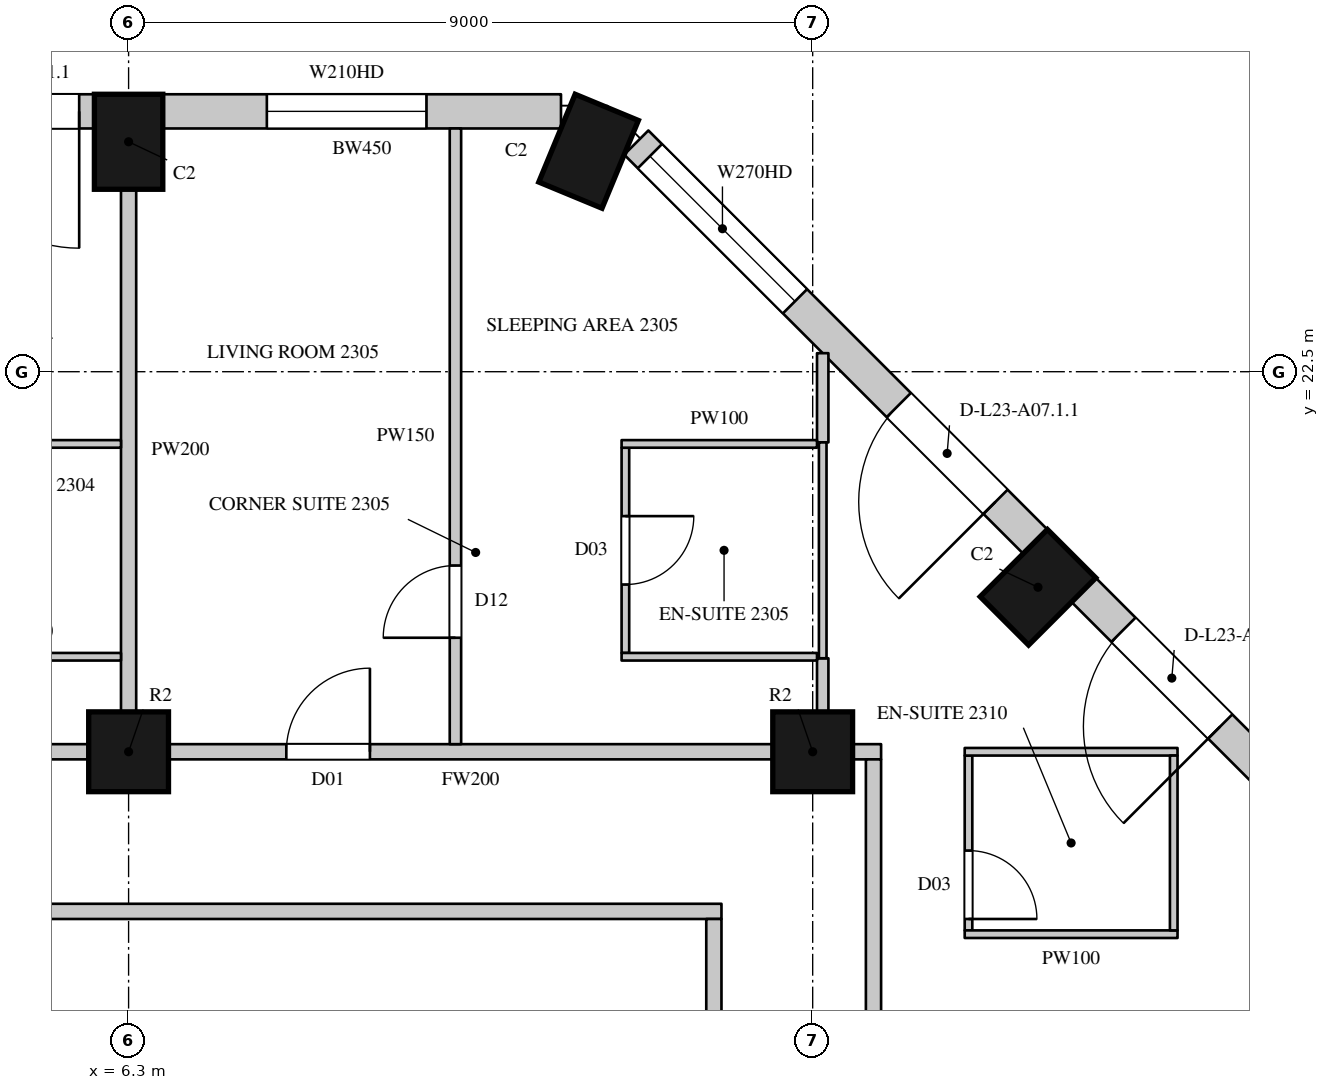
"""IFC4 building model, lengths in metres.
Left out: names, types, materials, properties, quantities, classifications, styles, units other than length and angle.
Written with IfcOpenShell. Run it as: python <this file> out.ifc"""

import sys

from ifc_helpers import new_model, si_unit, direction, frame, frame_2d, origin, origin_2d, place, context, subcontext, project, spatial, rectangle, circle, extrude, element, fill, save


model = new_model("IFC4")
c1 = context("Model", 3, precision=1e-05, world=origin(), true_north=direction((0.0, 1.0)))
c2 = subcontext(c1, "Body", "Model", "MODEL_VIEW")
j1 = project(units=[si_unit("LENGTHUNIT", "METRE"), si_unit("PLANEANGLEUNIT", "RADIAN")], contexts=[c1])
p1 = place(None, origin())
s1 = spatial("IfcSite", under=j1, at=p1, CompositionType="ELEMENT")
p2 = place(p1, origin())
s2 = spatial("IfcBuilding", under=s1, at=p2, CompositionType="ELEMENT")
p3 = place(p2, frame((0.0, 0.0, 113.1)))
s3 = spatial("IfcBuildingStorey", under=s2, at=p3, CompositionType="ELEMENT", Elevation=113.1)
for number, where, z_axis, x_axis in (
    (1, (18.264, 19.664, 0.0), (0.0, 0.0, 1.0), (-0.707, 0.707, 0.0)),
    (2, (12.352, 25.4, 0.0), (0.0, 0.0, 1.0), (-0.924, 0.383, 0.0)),
    (3, (6.3, 25.525, 0.0), (0.0, 0.0, 1.0), (-1.0, 0.0, 0.0)),
):
    element("IfcColumn", number, at=place(p3, frame(where, z_axis=z_axis, x_axis=x_axis)), inside=s3, PredefinedType="COLUMN", context=c2, shape_type="SweptSolid", body=[
        extrude(rectangle(XDim=0.9, YDim=1.25, at=origin_2d()), origin(), (0.0, 0.0, 1.0), 3.6),
    ])
for number, where, z_axis, x_axis in (
    (4, (6.3, 17.5, 0.0), (0.0, 0.0, 1.0), (1.0, 0.0, 0.0)),
    (5, (15.3, 17.5, 0.0), (0.0, 0.0, 1.0), (1.0, 0.0, 0.0)),
):
    element("IfcColumn", number, at=place(p3, frame(where, z_axis=z_axis, x_axis=x_axis)), inside=s3, PredefinedType="COLUMN", context=c2, shape_type="SweptSolid", body=[
        extrude(circle(Radius=0.525, at=origin_2d()), origin(), (0.0, 0.0, 1.0), 3.6),
    ])
p4 = place(p3, frame((24.115, 14.379, 0.0), z_axis=(0.0, 0.0, 1.0), x_axis=(-0.707106781187, 0.707106781187, 0.0)))
e6 = element("IfcWall", 6, at=p4, inside=s3, PredefinedType="SOLIDWALL", context=c2, shape_type="SweptSolid", body=[
    extrude(rectangle(XDim=7.424, YDim=0.45, at=frame_2d((3.712, 0.0))), origin(), (0.0, 0.0, 1.0), 3.3),
])
p5 = place(p4, frame((0.253, 0.0, 1.05)))
e7 = element("IfcOpeningElement", 7, at=p5, cuts=e6, PredefinedType="OPENING", context=c2, shape_type="SweptSolid", body=[
    extrude(rectangle(XDim=2.7, YDim=2.0, at=frame_2d((1.35, 1.0))), frame((0.0, 0.235, 0.0), z_axis=(0.0, -1.0, 0.0), x_axis=(1.0, 0.0, 0.0)), (0.0, 0.0, 1.0), 0.47),
])
p6 = place(p4, frame((4.884, 0.0, 0.0)))
e8 = element("IfcOpeningElement", 8, at=p6, cuts=e6, PredefinedType="OPENING", context=c2, shape_type="SweptSolid", body=[
    extrude(rectangle(XDim=1.8, YDim=2.4, at=frame_2d((0.9, 1.2))), frame((0.0, 0.235, 0.0), z_axis=(0.0, -1.0, 0.0), x_axis=(1.0, 0.0, 0.0)), (0.0, 0.0, 1.0), 0.47),
])
p7 = place(p3, frame((18.229, 20.265, 0.0), z_axis=(0.0, 0.0, 1.0), x_axis=(-0.707106781187, 0.707106781187, 0.0)))
e9 = element("IfcWall", 9, at=p7, inside=s3, PredefinedType="SOLIDWALL", context=c2, shape_type="SweptSolid", body=[
    extrude(rectangle(XDim=7.424, YDim=0.45, at=frame_2d((3.712, 0.0))), origin(), (0.0, 0.0, 1.0), 3.3),
])
p8 = place(p7, frame((0.74, 0.0, 0.0)))
e10 = element("IfcOpeningElement", 10, at=p8, cuts=e9, PredefinedType="OPENING", context=c2, shape_type="SweptSolid", body=[
    extrude(rectangle(XDim=1.8, YDim=2.4, at=frame_2d((0.9, 1.2))), frame((0.0, 0.235, 0.0), z_axis=(0.0, -1.0, 0.0), x_axis=(1.0, 0.0, 0.0)), (0.0, 0.0, 1.0), 0.47),
])
p9 = place(p7, frame((4.471, 0.0, 1.05)))
e11 = element("IfcOpeningElement", 11, at=p9, cuts=e9, PredefinedType="OPENING", context=c2, shape_type="SweptSolid", body=[
    extrude(rectangle(XDim=2.7, YDim=2.0, at=frame_2d((1.35, 1.0))), frame((0.0, 0.235, 0.0), z_axis=(0.0, -1.0, 0.0), x_axis=(1.0, 0.0, 0.0)), (0.0, 0.0, 1.0), 0.47),
])
p10 = place(p3, frame((11.989, 25.925, 0.0), z_axis=(0.0, 0.0, 1.0), x_axis=(-1.0, 0.0, 0.0)))
e12 = element("IfcWall", 12, at=p10, inside=s3, PredefinedType="SOLIDWALL", context=c2, shape_type="SweptSolid", body=[
    extrude(rectangle(XDim=5.239, YDim=0.45, at=frame_2d((2.619, 0.0))), origin(), (0.0, 0.0, 1.0), 3.3),
])
p11 = place(p10, frame((1.77, 0.0, 1.05)))
e13 = element("IfcOpeningElement", 13, at=p11, cuts=e12, PredefinedType="OPENING", context=c2, shape_type="SweptSolid", body=[
    extrude(rectangle(XDim=2.1, YDim=2.0, at=frame_2d((1.05, 1.0))), frame((0.0, 0.235, 0.0), z_axis=(0.0, -1.0, 0.0), x_axis=(1.0, 0.0, 0.0)), (0.0, 0.0, 1.0), 0.47),
])
p12 = place(p3, frame((5.85, 25.925, 0.0), z_axis=(0.0, 0.0, 1.0), x_axis=(-1.0, 0.0, 0.0)))
e14 = element("IfcWall", 14, at=p12, inside=s3, PredefinedType="SOLIDWALL", context=c2, shape_type="SweptSolid", body=[
    extrude(rectangle(XDim=8.1, YDim=0.45, at=frame_2d((4.05, 0.0))), origin(), (0.0, 0.0, 1.0), 3.3),
])
p13 = place(p12, frame((0.2, 0.0, 0.0)))
e15 = element("IfcOpeningElement", 15, at=p13, cuts=e14, PredefinedType="OPENING", context=c2, shape_type="SweptSolid", body=[
    extrude(rectangle(XDim=1.8, YDim=2.4, at=frame_2d((0.9, 1.2))), frame((0.0, 0.235, 0.0), z_axis=(0.0, -1.0, 0.0), x_axis=(1.0, 0.0, 0.0)), (0.0, 0.0, 1.0), 0.47),
])
p14 = place(p12, frame((2.2, 0.0, 1.05)))
e16 = element("IfcOpeningElement", 16, at=p14, cuts=e14, PredefinedType="OPENING", context=c2, shape_type="SweptSolid", body=[
    extrude(rectangle(XDim=1.2, YDim=2.0, at=frame_2d((0.6, 1.0))), frame((0.0, 0.235, 0.0), z_axis=(0.0, -1.0, 0.0), x_axis=(1.0, 0.0, 0.0)), (0.0, 0.0, 1.0), 0.47),
])
p15 = place(p12, frame((4.7, 0.0, 0.0)))
e17 = element("IfcOpeningElement", 17, at=p15, cuts=e14, PredefinedType="OPENING", context=c2, shape_type="SweptSolid", body=[
    extrude(rectangle(XDim=1.8, YDim=2.4, at=frame_2d((0.9, 1.2))), frame((0.0, 0.235, 0.0), z_axis=(0.0, -1.0, 0.0), x_axis=(1.0, 0.0, 0.0)), (0.0, 0.0, 1.0), 0.47),
])
p16 = place(p12, frame((6.7, 0.0, 1.05)))
e18 = element("IfcOpeningElement", 18, at=p16, cuts=e14, PredefinedType="OPENING", context=c2, shape_type="SweptSolid", body=[
    extrude(rectangle(XDim=1.2, YDim=2.0, at=frame_2d((0.6, 1.0))), frame((0.0, 0.235, 0.0), z_axis=(0.0, -1.0, 0.0), x_axis=(1.0, 0.0, 0.0)), (0.0, 0.0, 1.0), 0.47),
])
p17 = place(p3, frame((19.937, 20.078, 0.0), z_axis=(0.0, 0.0, 1.0), x_axis=(-0.707106781187, 0.707106781187, 0.0)))
e19 = element("IfcWall", 19, at=p17, inside=s3, PredefinedType="SOLIDWALL", context=c2, shape_type="SweptSolid", body=[
    extrude(rectangle(XDim=1.781, YDim=0.45, at=frame_2d((0.89, 0.0))), origin(), (0.0, 0.0, 1.0), 0.6),
])
p18 = place(p3, frame((16.486, 23.529, 0.0), z_axis=(0.0, 0.0, 1.0), x_axis=(-0.707022305137, 0.707191247145, 0.0)))
e20 = element("IfcWall", 20, at=p18, inside=s3, PredefinedType="SOLIDWALL", context=c2, shape_type="SweptSolid", body=[
    extrude(rectangle(XDim=1.445, YDim=0.45, at=frame_2d((0.723, 0.0))), origin(), (0.0, 0.0, 1.0), 0.6),
])
p19 = place(p3, frame((-2.175, 17.5, 0.0), z_axis=(0.0, 0.0, 1.0), x_axis=(1.0, 0.0, 0.0)))
e21 = element("IfcWall", 21, at=p19, inside=s3, PredefinedType="PARTITIONING", context=c2, shape_type="SweptSolid", body=[
    extrude(rectangle(XDim=7.95, YDim=0.2, at=frame_2d((3.975, 0.0))), origin(), (0.0, 0.0, 1.0), 2.75),
])
p20 = place(p19, frame((1.65, 0.0, 0.0)))
e22 = element("IfcOpeningElement", 22, at=p20, cuts=e21, PredefinedType="OPENING", context=c2, shape_type="SweptSolid", body=[
    extrude(rectangle(XDim=1.1, YDim=2.4, at=frame_2d((0.55, 1.2))), frame((0.0, 0.11, 0.0), z_axis=(0.0, -1.0, 0.0), x_axis=(1.0, 0.0, 0.0)), (0.0, 0.0, 1.0), 0.22),
])
p21 = place(p3, frame((6.825, 17.5, 0.0), z_axis=(0.0, 0.0, 1.0), x_axis=(1.0, 0.0, 0.0)))
e23 = element("IfcWall", 23, at=p21, inside=s3, PredefinedType="PARTITIONING", context=c2, shape_type="SweptSolid", body=[
    extrude(rectangle(XDim=7.95, YDim=0.2, at=frame_2d((3.975, 0.0))), origin(), (0.0, 0.0, 1.0), 2.75),
])
p22 = place(p21, frame((1.55, 0.0, 0.0)))
e24 = element("IfcOpeningElement", 24, at=p22, cuts=e23, PredefinedType="OPENING", context=c2, shape_type="SweptSolid", body=[
    extrude(rectangle(XDim=1.1, YDim=2.4, at=frame_2d((0.55, 1.2))), frame((0.0, 0.11, 0.0), z_axis=(0.0, -1.0, 0.0), x_axis=(1.0, 0.0, 0.0)), (0.0, 0.0, 1.0), 0.22),
])
p23 = place(p3, frame((15.825, 17.5, 0.0), z_axis=(0.0, 0.0, 1.0), x_axis=(1.0, 0.0, 0.0)))
e25 = element("IfcWall", 25, at=p23, inside=s3, PredefinedType="PARTITIONING", context=c2, shape_type="SweptSolid", body=[
    extrude(rectangle(XDim=0.375, YDim=0.2, at=frame_2d((0.188, 0.0))), origin(), (0.0, 0.0, 1.0), 3.3),
])
p24 = place(p3, frame((-2.8, 15.4, 0.0), z_axis=(0.0, 0.0, 1.0), x_axis=(1.0, 0.0, 0.0)))
e26 = element("IfcWall", 26, at=p24, inside=s3, PredefinedType="PARTITIONING", context=c2, shape_type="SweptSolid", body=[
    extrude(rectangle(XDim=16.9, YDim=0.2, at=frame_2d((8.45, 0.0))), origin(), (0.0, 0.0, 1.0), 3.3),
])
p25 = place(p3, frame((14.0, 6.825, 0.0), z_axis=(0.0, 0.0, 1.0), x_axis=(0.0, 1.0, 0.0)))
e27 = element("IfcWall", 27, at=p25, inside=s3, PredefinedType="PARTITIONING", context=c2, shape_type="SweptSolid", body=[
    extrude(rectangle(XDim=8.475, YDim=0.2, at=frame_2d((4.238, 0.0))), origin(), (0.0, 0.0, 1.0), 3.3),
])
p26 = place(p3, frame((16.1, 4.75, 0.0), z_axis=(0.0, 0.0, 1.0), x_axis=(0.0, 1.0, 0.0)))
e28 = element("IfcWall", 28, at=p26, inside=s3, PredefinedType="PARTITIONING", context=c2, shape_type="SweptSolid", body=[
    extrude(rectangle(XDim=12.65, YDim=0.2, at=frame_2d((6.325, 0.0))), origin(), (0.0, 0.0, 1.0), 3.3),
])
p27 = place(p26, frame((0.5, 0.0, 0.0)))
e29 = element("IfcOpeningElement", 29, at=p27, cuts=e28, PredefinedType="OPENING", context=c2, shape_type="SweptSolid", body=[
    extrude(rectangle(XDim=0.95, YDim=2.2, at=frame_2d((0.475, 1.1))), frame((0.0, 0.11, 0.0), z_axis=(0.0, -1.0, 0.0), x_axis=(1.0, 0.0, 0.0)), (0.0, 0.0, 1.0), 0.22),
])
p28 = place(p26, frame((6.9, 0.0, 0.0)))
e30 = element("IfcOpeningElement", 30, at=p28, cuts=e28, PredefinedType="OPENING", context=c2, shape_type="SweptSolid", body=[
    extrude(rectangle(XDim=0.95, YDim=2.2, at=frame_2d((0.475, 1.1))), frame((0.0, 0.11, 0.0), z_axis=(0.0, -1.0, 0.0), x_axis=(1.0, 0.0, 0.0)), (0.0, 0.0, 1.0), 0.22),
])
p29 = place(p3, frame((10.6, 17.6, 0.0), z_axis=(0.0, 0.0, 1.0), x_axis=(0.0, 1.0, 0.0)))
e31 = element("IfcWall", 31, at=p29, inside=s3, PredefinedType="PARTITIONING", context=c2, shape_type="SweptSolid", body=[
    extrude(rectangle(XDim=8.1, YDim=0.15, at=frame_2d((4.05, 0.0))), origin(), (0.0, 0.0, 1.0), 3.3),
])
p30 = place(p29, frame((1.4, 0.0, 0.0)))
e32 = element("IfcOpeningElement", 32, at=p30, cuts=e31, PredefinedType="OPENING", context=c2, shape_type="SweptSolid", body=[
    extrude(rectangle(XDim=0.95, YDim=2.2, at=frame_2d((0.475, 1.1))), frame((0.0, 0.085, 0.0), z_axis=(0.0, -1.0, 0.0), x_axis=(1.0, 0.0, 0.0)), (0.0, 0.0, 1.0), 0.17),
])
p31 = place(p3, frame((15.432, 18.016, 0.0), z_axis=(0.0, 0.0, 1.0), x_axis=(0.0, 1.0, 0.0)))
e33 = element("IfcWall", 33, at=p31, inside=s3, PredefinedType="PARTITIONING", context=c2, shape_type="SweptSolid", body=[
    extrude(rectangle(XDim=0.714, YDim=0.15, at=frame_2d((0.357, 0.0))), origin(), (0.0, 0.0, 1.0), 3.3),
])
p32 = place(p3, frame((15.432, 21.57, 0.0), z_axis=(0.0, 0.0, 1.0), x_axis=(0.0, 1.0, 0.0)))
e34 = element("IfcWall", 34, at=p32, inside=s3, PredefinedType="PARTITIONING", context=c2, shape_type="SweptSolid", body=[
    extrude(rectangle(XDim=1.174, YDim=0.15, at=frame_2d((0.587, 0.0))), origin(), (0.0, 0.0, 1.0), 3.3),
])
p33 = place(p3, frame((6.3, 18.025, 0.0), z_axis=(0.0, 0.0, 1.0), x_axis=(0.0, 1.0, 0.0)))
e35 = element("IfcWall", 35, at=p33, inside=s3, PredefinedType="PARTITIONING", context=c2, shape_type="SweptSolid", body=[
    extrude(rectangle(XDim=6.875, YDim=0.2, at=frame_2d((3.438, 0.0))), origin(), (0.0, 0.0, 1.0), 2.75),
])
for number, where, z_axis, x_axis in (
    (36, (3.654, 18.75, 0.0), (0.0, 0.0, 1.0), (1.0, 0.0, 0.0)),
    (37, (3.654, 21.55, 0.0), (0.0, 0.0, 1.0), (1.0, 0.0, 0.0)),
):
    element("IfcWall", number, at=place(p3, frame(where, z_axis=z_axis, x_axis=x_axis)), inside=s3, PredefinedType="PARTITIONING", context=c2, shape_type="SweptSolid", body=[
        extrude(rectangle(XDim=2.546, YDim=0.1, at=frame_2d((1.273, 0.0))), origin(), (0.0, 0.0, 1.0), 3.3),
    ])
p34 = place(p3, frame((12.836, 18.8, 0.0), z_axis=(0.0, 0.0, 1.0), x_axis=(0.0, 1.0, 0.0)))
e38 = element("IfcWall", 38, at=p34, inside=s3, PredefinedType="PARTITIONING", context=c2, shape_type="SweptSolid", body=[
    extrude(rectangle(XDim=2.7, YDim=0.1, at=frame_2d((1.35, 0.0))), origin(), (0.0, 0.0, 1.0), 3.3),
])
p35 = place(p34, frame((0.9, 0.0, 0.0)))
e39 = element("IfcOpeningElement", 39, at=p35, cuts=e38, PredefinedType="OPENING", context=c2, shape_type="SweptSolid", body=[
    extrude(rectangle(XDim=0.9, YDim=2.2, at=frame_2d((0.45, 1.1))), frame((0.0, 0.06, 0.0), z_axis=(0.0, -1.0, 0.0), x_axis=(1.0, 0.0, 0.0)), (0.0, 0.0, 1.0), 0.12),
])
for number, where, z_axis, x_axis in (
    (40, (12.786, 18.75, 0.0), (0.0, 0.0, 1.0), (1.0, 0.0, 0.0)),
    (41, (12.786, 21.55, 0.0), (0.0, 0.0, 1.0), (1.0, 0.0, 0.0)),
):
    element("IfcWall", number, at=place(p3, frame(where, z_axis=z_axis, x_axis=x_axis)), inside=s3, PredefinedType="PARTITIONING", context=c2, shape_type="SweptSolid", body=[
        extrude(rectangle(XDim=2.571, YDim=0.1, at=frame_2d((1.286, 0.0))), origin(), (0.0, 0.0, 1.0), 3.3),
    ])
p36 = place(p3, frame((15.432, 18.73, 0.0), z_axis=(0.0, 0.0, 1.0), x_axis=(0.0, 1.0, 0.0)))
e42 = element("IfcWall", 42, at=p36, inside=s3, PredefinedType="PARTITIONING", context=c2, shape_type="SweptSolid", body=[
    extrude(rectangle(XDim=2.84, YDim=0.1, at=frame_2d((1.42, 0.0))), origin(), (0.0, 0.0, 1.0), 3.3),
])
p37 = place(p3, frame((17.35, 15.15, 0.0), z_axis=(0.0, 0.0, 1.0), x_axis=(0.0, 1.0, 0.0)))
e43 = element("IfcWall", 43, at=p37, inside=s3, PredefinedType="PARTITIONING", context=c2, shape_type="SweptSolid", body=[
    extrude(rectangle(XDim=2.3, YDim=0.1, at=frame_2d((1.15, 0.0))), origin(), (0.0, 0.0, 1.0), 3.3),
])
p38 = place(p37, frame((0.15, 0.0, 0.0)))
e44 = element("IfcOpeningElement", 44, at=p38, cuts=e43, PredefinedType="OPENING", context=c2, shape_type="SweptSolid", body=[
    extrude(rectangle(XDim=0.9, YDim=2.2, at=frame_2d((0.45, 1.1))), frame((0.0, 0.06, 0.0), z_axis=(0.0, -1.0, 0.0), x_axis=(1.0, 0.0, 0.0)), (0.0, 0.0, 1.0), 0.12),
])
for number, where, z_axis, x_axis in (
    (45, (17.3, 15.1, 0.0), (0.0, 0.0, 1.0), (1.0, 0.0, 0.0)),
    (46, (17.3, 17.5, 0.0), (0.0, 0.0, 1.0), (1.0, 0.0, 0.0)),
):
    element("IfcWall", number, at=place(p3, frame(where, z_axis=z_axis, x_axis=x_axis)), inside=s3, PredefinedType="PARTITIONING", context=c2, shape_type="SweptSolid", body=[
        extrude(rectangle(XDim=2.8, YDim=0.1, at=frame_2d((1.4, 0.0))), origin(), (0.0, 0.0, 1.0), 3.3),
    ])
p39 = place(p3, frame((20.05, 15.15, 0.0), z_axis=(0.0, 0.0, 1.0), x_axis=(0.0, 1.0, 0.0)))
e47 = element("IfcWall", 47, at=p39, inside=s3, PredefinedType="PARTITIONING", context=c2, shape_type="SweptSolid", body=[
    extrude(rectangle(XDim=2.3, YDim=0.1, at=frame_2d((1.15, 0.0))), origin(), (0.0, 0.0, 1.0), 3.3),
])
p40 = place(p6, origin())
e48 = element("IfcDoor", 48, at=p40, inside=s3, OperationType="SLIDING_TO_LEFT", PredefinedType="DOOR", context=c2, shape_type="SweptSolid", body=[
    extrude(rectangle(XDim=1.8, YDim=2.4, at=frame_2d((0.9, 1.2))), frame((0.0, 0.13, 0.0), z_axis=(0.0, -1.0, 0.0), x_axis=(1.0, 0.0, 0.0)), (0.0, 0.0, 1.0), 0.05),
])
fill(e8, e48)
p41 = place(p8, origin())
e49 = element("IfcDoor", 49, at=p41, inside=s3, OperationType="SLIDING_TO_LEFT", PredefinedType="DOOR", context=c2, shape_type="SweptSolid", body=[
    extrude(rectangle(XDim=1.8, YDim=2.4, at=frame_2d((0.9, 1.2))), frame((0.0, 0.13, 0.0), z_axis=(0.0, -1.0, 0.0), x_axis=(1.0, 0.0, 0.0)), (0.0, 0.0, 1.0), 0.05),
])
fill(e10, e49)
p42 = place(p9, origin())
e50 = element("IfcWindow", 50, at=p42, inside=s3, PartitioningType="SINGLE_PANEL", PredefinedType="WINDOW", context=c2, shape_type="SweptSolid", body=[
    extrude(rectangle(XDim=2.7, YDim=2.0, at=frame_2d((1.35, 1.0))), frame((0.0, 0.135, 0.0), z_axis=(0.0, -1.0, 0.0), x_axis=(1.0, 0.0, 0.0)), (0.0, 0.0, 1.0), 0.06),
])
fill(e11, e50)
p43 = place(p13, origin())
e51 = element("IfcDoor", 51, at=p43, inside=s3, OperationType="SLIDING_TO_LEFT", PredefinedType="DOOR", context=c2, shape_type="SweptSolid", body=[
    extrude(rectangle(XDim=1.8, YDim=2.4, at=frame_2d((0.9, 1.2))), frame((0.0, 0.13, 0.0), z_axis=(0.0, -1.0, 0.0), x_axis=(1.0, 0.0, 0.0)), (0.0, 0.0, 1.0), 0.05),
])
fill(e15, e51)
p44 = place(p22, origin())
e52 = element("IfcDoor", 52, at=p44, inside=s3, OperationType="SINGLE_SWING_RIGHT", PredefinedType="DOOR", context=c2, shape_type="SweptSolid", body=[
    extrude(rectangle(XDim=1.1, YDim=2.4, at=frame_2d((0.55, 1.2))), frame((0.0, 0.025, 0.0), z_axis=(0.0, -1.0, 0.0), x_axis=(1.0, 0.0, 0.0)), (0.0, 0.0, 1.0), 0.05),
])
fill(e24, e52)
p45 = place(p30, origin())
e53 = element("IfcDoor", 53, at=p45, inside=s3, OperationType="SINGLE_SWING_LEFT", PredefinedType="DOOR", context=c2, shape_type="SweptSolid", body=[
    extrude(rectangle(XDim=0.95, YDim=2.2, at=frame_2d((0.475, 1.1))), frame((0.0, 0.025, 0.0), z_axis=(0.0, -1.0, 0.0), x_axis=(1.0, 0.0, 0.0)), (0.0, 0.0, 1.0), 0.05),
])
fill(e32, e53)
p46 = place(p35, origin())
e54 = element("IfcDoor", 54, at=p46, inside=s3, OperationType="SINGLE_SWING_LEFT", PredefinedType="DOOR", context=c2, shape_type="SweptSolid", body=[
    extrude(rectangle(XDim=0.9, YDim=2.2, at=frame_2d((0.45, 1.1))), frame((0.0, 0.025, 0.0), z_axis=(0.0, -1.0, 0.0), x_axis=(1.0, 0.0, 0.0)), (0.0, 0.0, 1.0), 0.05),
])
fill(e39, e54)
p47 = place(p38, origin())
e55 = element("IfcDoor", 55, at=p47, inside=s3, OperationType="SINGLE_SWING_RIGHT", PredefinedType="DOOR", context=c2, shape_type="SweptSolid", body=[
    extrude(rectangle(XDim=0.9, YDim=2.2, at=frame_2d((0.45, 1.1))), frame((0.0, 0.025, 0.0), z_axis=(0.0, -1.0, 0.0), x_axis=(1.0, 0.0, 0.0)), (0.0, 0.0, 1.0), 0.05),
])
fill(e44, e55)
p48 = place(p11, origin())
e56 = element("IfcWindow", 56, at=p48, inside=s3, PartitioningType="SINGLE_PANEL", PredefinedType="WINDOW", context=c2, shape_type="SweptSolid", body=[
    extrude(rectangle(XDim=2.1, YDim=2.0, at=frame_2d((1.05, 1.0))), frame((0.0, 0.135, 0.0), z_axis=(0.0, -1.0, 0.0), x_axis=(1.0, 0.0, 0.0)), (0.0, 0.0, 1.0), 0.06),
])
fill(e13, e56)
save(model, sys.argv[1])
